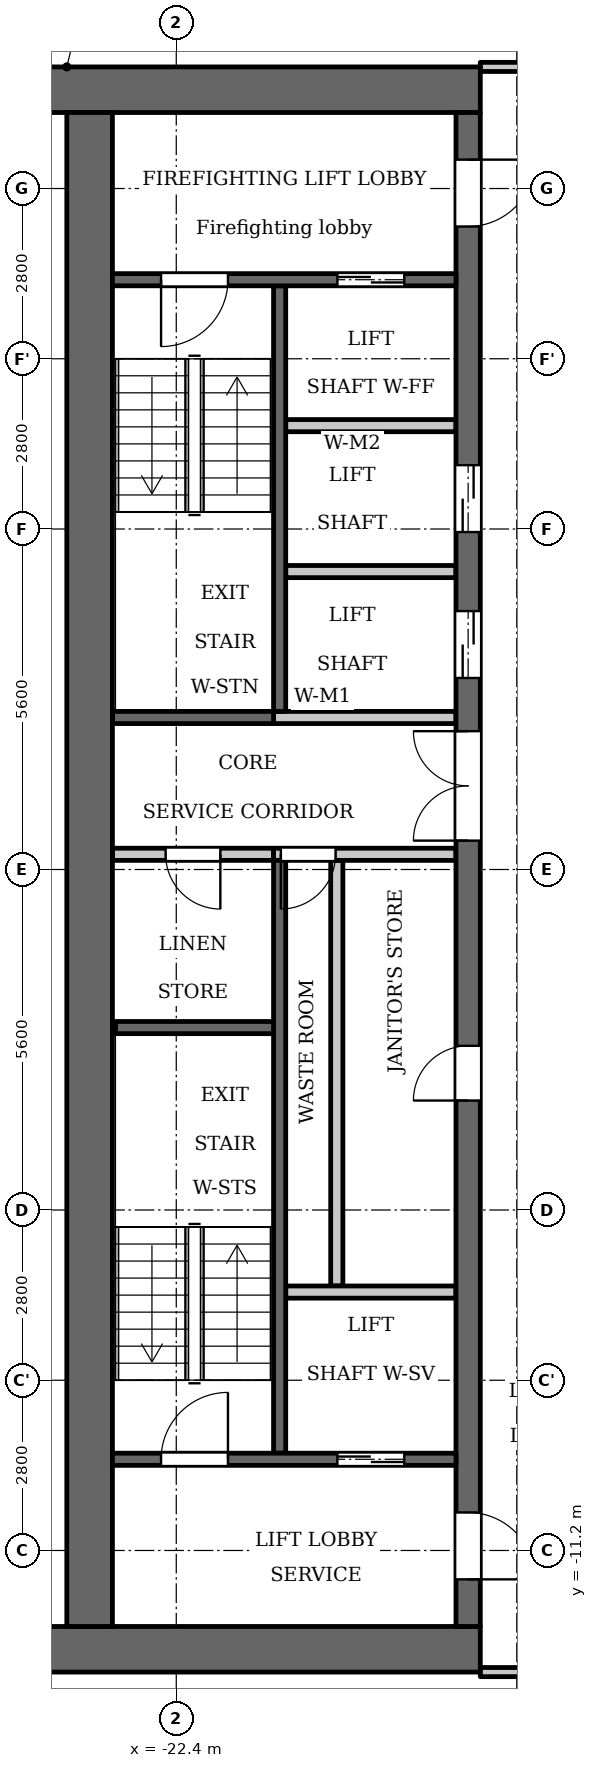
"""IFC4 building model, lengths in metres.
Left out: names, types, materials, properties, quantities, classifications, styles, units other than length and angle.
Written with IfcOpenShell. Run it as: python <this file> out.ifc"""

import sys

from ifc_helpers import new_model, si_unit, direction, frame, frame_2d, origin, place, context, subcontext, project, spatial, rectangle, extrude, element, fill, save


model = new_model("IFC4")
c1 = context("Model", 3, precision=1e-05, world=origin(), true_north=direction((0.0, 1.0)))
c2 = subcontext(c1, "Body", "Model", "MODEL_VIEW")
j1 = project(units=[si_unit("LENGTHUNIT", "METRE"), si_unit("PLANEANGLEUNIT", "RADIAN")], contexts=[c1])
p1 = place(None, origin())
s1 = spatial("IfcSite", under=j1, at=p1, CompositionType="ELEMENT")
p2 = place(p1, origin())
s2 = spatial("IfcBuilding", under=s1, at=p2, CompositionType="ELEMENT")
p3 = place(p2, frame((0.0, 0.0, 213.4)))
s3 = spatial("IfcBuildingStorey", under=s2, at=p3, CompositionType="ELEMENT", Elevation=213.4)
p4 = place(p3, frame((-20.7, 2.6, 0.0), z_axis=(0.0, 0.0, 1.0), x_axis=(0.0, 1.0, 0.0)))
e1 = element("IfcWall", 1, at=p4, inside=s3, PredefinedType="SHEAR", context=c2, shape_type="SweptSolid", body=[
    extrude(rectangle(XDim=7.0, YDim=0.2, at=frame_2d((3.5, 0.0))), origin(), (0.0, 0.0, 1.0), 3.2),
])
p5 = place(p3, frame((-20.7, -9.6, 0.0), z_axis=(0.0, 0.0, 1.0), x_axis=(0.0, 1.0, 0.0)))
e2 = element("IfcWall", 2, at=p5, inside=s3, PredefinedType="SHEAR", context=c2, shape_type="SweptSolid", body=[
    extrude(rectangle(XDim=9.75, YDim=0.2, at=frame_2d((4.875, 0.0))), origin(), (0.0, 0.0, 1.0), 3.2),
])
p6 = place(p3, frame((-20.8, 2.5, 0.0), z_axis=(0.0, 0.0, 1.0), x_axis=(-1.0, 0.0, 0.0)))
e3 = element("IfcWall", 3, at=p6, inside=s3, PredefinedType="SHEAR", context=c2, shape_type="SweptSolid", body=[
    extrude(rectangle(XDim=2.65, YDim=0.2, at=frame_2d((1.325, 0.0))), origin(), (0.0, 0.0, 1.0), 3.2),
])
p7 = place(p3, frame((-20.8, 0.25, 0.0), z_axis=(0.0, 0.0, 1.0), x_axis=(-1.0, 0.0, 0.0)))
e4 = element("IfcWall", 4, at=p7, inside=s3, PredefinedType="PARTITIONING", context=c2, shape_type="SweptSolid", body=[
    extrude(rectangle(XDim=2.65, YDim=0.2, at=frame_2d((1.325, 0.0))), origin(), (0.0, 0.0, 1.0), 3.2),
])
p8 = place(p7, frame((0.875, 0.0, 0.0)))
e5 = element("IfcOpeningElement", 5, at=p8, cuts=e4, PredefinedType="OPENING", context=c2, shape_type="SweptSolid", body=[
    extrude(rectangle(XDim=0.9, YDim=2.1, at=frame_2d((0.45, 1.05))), frame((0.0, 0.11, 0.0), z_axis=(0.0, -1.0, 0.0), x_axis=(1.0, 0.0, 0.0)), (0.0, 0.0, 1.0), 0.22),
])
for number, where, z_axis, x_axis in (
    (6, (-17.4, 12.825, 0.0), (0.0, 0.0, 1.0), (-1.0, 0.0, 0.0)),
    (7, (-17.4, -12.825, 0.0), (0.0, 0.0, 1.0), (-1.0, 0.0, 0.0)),
):
    element("IfcWall", number, at=place(p3, frame(where, z_axis=z_axis, x_axis=x_axis)), inside=s3, PredefinedType="SHEAR", context=c2, shape_type="SweptSolid", body=[
        extrude(rectangle(XDim=7.6, YDim=0.75, at=frame_2d((3.8, 0.0))), origin(), (0.0, 0.0, 1.0), 3.2),
    ])
p9 = place(p3, frame((-19.76, -6.85, 0.0), z_axis=(0.0, 0.0, 1.0), x_axis=(0.0, 1.0, 0.0)))
e8 = element("IfcWall", 8, at=p9, inside=s3, PredefinedType="PARTITIONING", context=c2, shape_type="SweptSolid", body=[
    extrude(rectangle(XDim=7.0, YDim=0.2, at=frame_2d((3.5, 0.0))), origin(), (0.0, 0.0, 1.0), 3.2),
])
p10 = place(p3, frame((-17.6, -12.45, 0.0), z_axis=(0.0, 0.0, 1.0), x_axis=(0.0, 1.0, 0.0)))
e9 = element("IfcWall", 9, at=p10, inside=s3, PredefinedType="SHEAR", context=c2, shape_type="SweptSolid", body=[
    extrude(rectangle(XDim=24.9, YDim=0.4, at=frame_2d((12.45, 0.0))), origin(), (0.0, 0.0, 1.0), 3.2),
])
p11 = place(p10, frame((8.65, 0.0, 0.0)))
e10 = element("IfcOpeningElement", 10, at=p11, cuts=e9, PredefinedType="OPENING", context=c2, shape_type="SweptSolid", body=[
    extrude(rectangle(XDim=0.9, YDim=2.1, at=frame_2d((0.45, 1.05))), frame((0.0, 0.21, 0.0), z_axis=(0.0, -1.0, 0.0), x_axis=(1.0, 0.0, 0.0)), (0.0, 0.0, 1.0), 0.42),
])
p12 = place(p10, frame((15.6, 0.0, 0.0)))
e11 = element("IfcOpeningElement", 11, at=p12, cuts=e9, PredefinedType="OPENING", context=c2, shape_type="SweptSolid", body=[
    extrude(rectangle(XDim=1.1, YDim=2.1, at=frame_2d((0.55, 1.05))), frame((0.0, 0.21, 0.0), z_axis=(0.0, -1.0, 0.0), x_axis=(1.0, 0.0, 0.0)), (0.0, 0.0, 1.0), 0.42),
])
p13 = place(p10, frame((18.0, 0.0, 0.0)))
e12 = element("IfcOpeningElement", 12, at=p13, cuts=e9, PredefinedType="OPENING", context=c2, shape_type="SweptSolid", body=[
    extrude(rectangle(XDim=1.1, YDim=2.1, at=frame_2d((0.55, 1.05))), frame((0.0, 0.21, 0.0), z_axis=(0.0, -1.0, 0.0), x_axis=(1.0, 0.0, 0.0)), (0.0, 0.0, 1.0), 0.42),
])
p14 = place(p10, frame((23.025, 0.0, 0.0)))
e13 = element("IfcOpeningElement", 13, at=p14, cuts=e9, PredefinedType="OPENING", context=c2, shape_type="SweptSolid", body=[
    extrude(rectangle(XDim=1.1, YDim=2.1, at=frame_2d((0.55, 1.05))), frame((0.0, 0.21, 0.0), z_axis=(0.0, -1.0, 0.0), x_axis=(1.0, 0.0, 0.0)), (0.0, 0.0, 1.0), 0.42),
])
p15 = place(p10, frame((0.775, 0.0, 0.0)))
e14 = element("IfcOpeningElement", 14, at=p15, cuts=e9, PredefinedType="OPENING", context=c2, shape_type="SweptSolid", body=[
    extrude(rectangle(XDim=1.1, YDim=2.1, at=frame_2d((0.55, 1.05))), frame((0.0, 0.21, 0.0), z_axis=(0.0, -1.0, 0.0), x_axis=(1.0, 0.0, 0.0)), (0.0, 0.0, 1.0), 0.42),
])
p16 = place(p10, frame((12.925, 0.0, 0.0)))
e15 = element("IfcOpeningElement", 15, at=p16, cuts=e9, PredefinedType="OPENING", context=c2, shape_type="SweptSolid", body=[
    extrude(rectangle(XDim=1.8, YDim=2.1, at=frame_2d((0.9, 1.05))), frame((0.0, 0.21, 0.0), z_axis=(0.0, -1.0, 0.0), x_axis=(1.0, 0.0, 0.0)), (0.0, 0.0, 1.0), 0.42),
])
p17 = place(p3, frame((-23.825, -12.45, 0.0), z_axis=(0.0, 0.0, 1.0), x_axis=(0.0, 1.0, 0.0)))
e16 = element("IfcWall", 16, at=p17, inside=s3, PredefinedType="SHEAR", context=c2, shape_type="SweptSolid", body=[
    extrude(rectangle(XDim=24.9, YDim=0.75, at=frame_2d((12.45, 0.0))), origin(), (0.0, 0.0, 1.0), 3.2),
])
p18 = place(p3, frame((-17.8, -9.7, 0.0), z_axis=(0.0, 0.0, 1.0), x_axis=(-1.0, 0.0, 0.0)))
e17 = element("IfcWall", 17, at=p18, inside=s3, PredefinedType="SHEAR", context=c2, shape_type="SweptSolid", body=[
    extrude(rectangle(XDim=5.65, YDim=0.2, at=frame_2d((2.825, 0.0))), origin(), (0.0, 0.0, 1.0), 3.2),
])
p19 = place(p18, frame((0.85, 0.0, 0.0)))
e18 = element("IfcOpeningElement", 18, at=p19, cuts=e17, PredefinedType="OPENING", context=c2, shape_type="SweptSolid", body=[
    extrude(rectangle(XDim=1.1, YDim=2.1, at=frame_2d((0.55, 1.05))), frame((0.0, 0.11, 0.0), z_axis=(0.0, -1.0, 0.0), x_axis=(1.0, 0.0, 0.0)), (0.0, 0.0, 1.0), 0.22),
])
p20 = place(p18, frame((3.75, 0.0, 0.0)))
e19 = element("IfcOpeningElement", 19, at=p20, cuts=e17, PredefinedType="OPENING", context=c2, shape_type="SweptSolid", body=[
    extrude(rectangle(XDim=1.1, YDim=2.1, at=frame_2d((0.55, 1.05))), frame((0.0, 0.11, 0.0), z_axis=(0.0, -1.0, 0.0), x_axis=(1.0, 0.0, 0.0)), (0.0, 0.0, 1.0), 0.22),
])
p21 = place(p3, frame((-17.8, -6.95, 0.0), z_axis=(0.0, 0.0, 1.0), x_axis=(-1.0, 0.0, 0.0)))
e20 = element("IfcWall", 20, at=p21, inside=s3, PredefinedType="PARTITIONING", context=c2, shape_type="SweptSolid", body=[
    extrude(rectangle(XDim=2.8, YDim=0.2, at=frame_2d((1.4, 0.0))), origin(), (0.0, 0.0, 1.0), 3.2),
])
p22 = place(p3, frame((-17.8, 0.25, 0.0), z_axis=(0.0, 0.0, 1.0), x_axis=(-1.0, 0.0, 0.0)))
e21 = element("IfcWall", 21, at=p22, inside=s3, PredefinedType="PARTITIONING", context=c2, shape_type="SweptSolid", body=[
    extrude(rectangle(XDim=3.0, YDim=0.2, at=frame_2d((1.5, 0.0))), origin(), (0.0, 0.0, 1.0), 3.2),
])
p23 = place(p22, frame((1.98, 0.0, 0.0)))
e22 = element("IfcOpeningElement", 22, at=p23, cuts=e21, PredefinedType="OPENING", context=c2, shape_type="SweptSolid", body=[
    extrude(rectangle(XDim=0.9, YDim=2.1, at=frame_2d((0.45, 1.05))), frame((0.0, 0.11, 0.0), z_axis=(0.0, -1.0, 0.0), x_axis=(1.0, 0.0, 0.0)), (0.0, 0.0, 1.0), 0.22),
])
p24 = place(p3, frame((-17.8, 2.5, 0.0), z_axis=(0.0, 0.0, 1.0), x_axis=(-1.0, 0.0, 0.0)))
e23 = element("IfcWall", 23, at=p24, inside=s3, PredefinedType="PARTITIONING", context=c2, shape_type="SweptSolid", body=[
    extrude(rectangle(XDim=3.0, YDim=0.2, at=frame_2d((1.5, 0.0))), origin(), (0.0, 0.0, 1.0), 3.2),
])
for number, where, z_axis, x_axis in (
    (24, (-17.8, 4.9, 0.0), (0.0, 0.0, 1.0), (-1.0, 0.0, 0.0)),
    (25, (-17.8, 7.3, 0.0), (0.0, 0.0, 1.0), (-1.0, 0.0, 0.0)),
):
    element("IfcWall", number, at=place(p3, frame(where, z_axis=z_axis, x_axis=x_axis)), inside=s3, PredefinedType="PARTITIONING", context=c2, shape_type="SweptSolid", body=[
        extrude(rectangle(XDim=2.8, YDim=0.2, at=frame_2d((1.4, 0.0))), origin(), (0.0, 0.0, 1.0), 3.2),
    ])
p25 = place(p3, frame((-17.8, 9.7, 0.0), z_axis=(0.0, 0.0, 1.0), x_axis=(-1.0, 0.0, 0.0)))
e26 = element("IfcWall", 26, at=p25, inside=s3, PredefinedType="SHEAR", context=c2, shape_type="SweptSolid", body=[
    extrude(rectangle(XDim=5.65, YDim=0.2, at=frame_2d((2.825, 0.0))), origin(), (0.0, 0.0, 1.0), 3.2),
])
p26 = place(p25, frame((0.85, 0.0, 0.0)))
e27 = element("IfcOpeningElement", 27, at=p26, cuts=e26, PredefinedType="OPENING", context=c2, shape_type="SweptSolid", body=[
    extrude(rectangle(XDim=1.1, YDim=2.1, at=frame_2d((0.55, 1.05))), frame((0.0, 0.11, 0.0), z_axis=(0.0, -1.0, 0.0), x_axis=(1.0, 0.0, 0.0)), (0.0, 0.0, 1.0), 0.22),
])
p27 = place(p25, frame((3.75, 0.0, 0.0)))
e28 = element("IfcOpeningElement", 28, at=p27, cuts=e26, PredefinedType="OPENING", context=c2, shape_type="SweptSolid", body=[
    extrude(rectangle(XDim=1.1, YDim=2.1, at=frame_2d((0.55, 1.05))), frame((0.0, 0.11, 0.0), z_axis=(0.0, -1.0, 0.0), x_axis=(1.0, 0.0, 0.0)), (0.0, 0.0, 1.0), 0.22),
])
p28 = place(p3, frame((-20.8, -2.6, 0.0), z_axis=(0.0, 0.0, 1.0), x_axis=(-1.0, 0.0, 0.0)))
e29 = element("IfcWall", 29, at=p28, inside=s3, PredefinedType="SHEAR", context=c2, shape_type="SweptSolid", body=[
    extrude(rectangle(XDim=2.6, YDim=0.2, at=frame_2d((1.3, 0.0))), origin(), (0.0, 0.0, 1.0), 3.2),
])
p29 = place(p3, frame((-17.4, -13.2, 0.0), z_axis=(0.0, 0.0, 1.0), x_axis=(1.0, 0.0, 0.0)))
e30 = element("IfcWall", 30, at=p29, inside=s3, PredefinedType="PARTITIONING", context=c2, shape_type="SweptSolid", body=[
    extrude(rectangle(XDim=34.8, YDim=0.15, at=frame_2d((17.4, 0.0))), origin(), (0.0, 0.0, 1.0), 3.2),
])
p30 = place(p29, frame((0.65, 0.0, 0.0)))
e31 = element("IfcOpeningElement", 31, at=p30, cuts=e30, PredefinedType="OPENING", context=c2, shape_type="SweptSolid", body=[
    extrude(rectangle(XDim=1.0, YDim=2.1, at=frame_2d((0.5, 1.05))), frame((0.0, 0.085, 0.0), z_axis=(0.0, -1.0, 0.0), x_axis=(1.0, 0.0, 0.0)), (0.0, 0.0, 1.0), 0.17),
])
p31 = place(p29, frame((33.05, 0.0, 0.0)))
e32 = element("IfcOpeningElement", 32, at=p31, cuts=e30, PredefinedType="OPENING", context=c2, shape_type="SweptSolid", body=[
    extrude(rectangle(XDim=1.0, YDim=2.1, at=frame_2d((0.5, 1.05))), frame((0.0, 0.085, 0.0), z_axis=(0.0, -1.0, 0.0), x_axis=(1.0, 0.0, 0.0)), (0.0, 0.0, 1.0), 0.17),
])
p32 = place(p29, frame((4.55, 0.0, 0.0)))
e33 = element("IfcOpeningElement", 33, at=p32, cuts=e30, PredefinedType="OPENING", context=c2, shape_type="SweptSolid", body=[
    extrude(rectangle(XDim=1.0, YDim=2.1, at=frame_2d((0.5, 1.05))), frame((0.0, 0.085, 0.0), z_axis=(0.0, -1.0, 0.0), x_axis=(1.0, 0.0, 0.0)), (0.0, 0.0, 1.0), 0.17),
])
p33 = place(p29, frame((6.9, 0.0, 0.0)))
e34 = element("IfcOpeningElement", 34, at=p33, cuts=e30, PredefinedType="OPENING", context=c2, shape_type="SweptSolid", body=[
    extrude(rectangle(XDim=1.0, YDim=2.1, at=frame_2d((0.5, 1.05))), frame((0.0, 0.085, 0.0), z_axis=(0.0, -1.0, 0.0), x_axis=(1.0, 0.0, 0.0)), (0.0, 0.0, 1.0), 0.17),
])
p34 = place(p29, frame((15.75, 0.0, 0.0)))
e35 = element("IfcOpeningElement", 35, at=p34, cuts=e30, PredefinedType="OPENING", context=c2, shape_type="SweptSolid", body=[
    extrude(rectangle(XDim=1.0, YDim=2.1, at=frame_2d((0.5, 1.05))), frame((0.0, 0.085, 0.0), z_axis=(0.0, -1.0, 0.0), x_axis=(1.0, 0.0, 0.0)), (0.0, 0.0, 1.0), 0.17),
])
p35 = place(p29, frame((18.1, 0.0, 0.0)))
e36 = element("IfcOpeningElement", 36, at=p35, cuts=e30, PredefinedType="OPENING", context=c2, shape_type="SweptSolid", body=[
    extrude(rectangle(XDim=1.0, YDim=2.1, at=frame_2d((0.5, 1.05))), frame((0.0, 0.085, 0.0), z_axis=(0.0, -1.0, 0.0), x_axis=(1.0, 0.0, 0.0)), (0.0, 0.0, 1.0), 0.17),
])
p36 = place(p29, frame((26.95, 0.0, 0.0)))
e37 = element("IfcOpeningElement", 37, at=p36, cuts=e30, PredefinedType="OPENING", context=c2, shape_type="SweptSolid", body=[
    extrude(rectangle(XDim=1.0, YDim=2.1, at=frame_2d((0.5, 1.05))), frame((0.0, 0.085, 0.0), z_axis=(0.0, -1.0, 0.0), x_axis=(1.0, 0.0, 0.0)), (0.0, 0.0, 1.0), 0.17),
])
p37 = place(p29, frame((29.25, 0.0, 0.0)))
e38 = element("IfcOpeningElement", 38, at=p37, cuts=e30, PredefinedType="OPENING", context=c2, shape_type="SweptSolid", body=[
    extrude(rectangle(XDim=1.0, YDim=2.1, at=frame_2d((0.5, 1.05))), frame((0.0, 0.085, 0.0), z_axis=(0.0, -1.0, 0.0), x_axis=(1.0, 0.0, 0.0)), (0.0, 0.0, 1.0), 0.17),
])
p38 = place(p3, frame((-17.4, 13.2, 0.0), z_axis=(0.0, 0.0, 1.0), x_axis=(1.0, 0.0, 0.0)))
e39 = element("IfcWall", 39, at=p38, inside=s3, PredefinedType="PARTITIONING", context=c2, shape_type="SweptSolid", body=[
    extrude(rectangle(XDim=34.8, YDim=0.15, at=frame_2d((17.4, 0.0))), origin(), (0.0, 0.0, 1.0), 3.2),
])
p39 = place(p38, frame((0.75, 0.0, 0.0)))
e40 = element("IfcOpeningElement", 40, at=p39, cuts=e39, PredefinedType="OPENING", context=c2, shape_type="SweptSolid", body=[
    extrude(rectangle(XDim=1.0, YDim=2.1, at=frame_2d((0.5, 1.05))), frame((0.0, 0.085, 0.0), z_axis=(0.0, -1.0, 0.0), x_axis=(1.0, 0.0, 0.0)), (0.0, 0.0, 1.0), 0.17),
])
p40 = place(p38, frame((33.15, 0.0, 0.0)))
e41 = element("IfcOpeningElement", 41, at=p40, cuts=e39, PredefinedType="OPENING", context=c2, shape_type="SweptSolid", body=[
    extrude(rectangle(XDim=1.0, YDim=2.1, at=frame_2d((0.5, 1.05))), frame((0.0, 0.085, 0.0), z_axis=(0.0, -1.0, 0.0), x_axis=(1.0, 0.0, 0.0)), (0.0, 0.0, 1.0), 0.17),
])
p41 = place(p38, frame((12.45, 0.0, 0.0)))
e42 = element("IfcOpeningElement", 42, at=p41, cuts=e39, PredefinedType="OPENING", context=c2, shape_type="SweptSolid", body=[
    extrude(rectangle(XDim=1.0, YDim=2.1, at=frame_2d((0.5, 1.05))), frame((0.0, 0.085, 0.0), z_axis=(0.0, -1.0, 0.0), x_axis=(1.0, 0.0, 0.0)), (0.0, 0.0, 1.0), 0.17),
])
p42 = place(p38, frame((18.05, 0.0, 0.0)))
e43 = element("IfcOpeningElement", 43, at=p42, cuts=e39, PredefinedType="OPENING", context=c2, shape_type="SweptSolid", body=[
    extrude(rectangle(XDim=1.0, YDim=2.1, at=frame_2d((0.5, 1.05))), frame((0.0, 0.085, 0.0), z_axis=(0.0, -1.0, 0.0), x_axis=(1.0, 0.0, 0.0)), (0.0, 0.0, 1.0), 0.17),
])
p43 = place(p19, origin())
e44 = element("IfcDoor", 44, at=p43, inside=s3, OperationType="DOUBLE_DOOR_SLIDING", PredefinedType="DOOR", context=c2, shape_type="SweptSolid", body=[
    extrude(rectangle(XDim=1.1, YDim=2.1, at=frame_2d((0.55, 1.05))), frame((0.0, 0.025, 0.0), z_axis=(0.0, -1.0, 0.0), x_axis=(1.0, 0.0, 0.0)), (0.0, 0.0, 1.0), 0.05),
])
fill(e18, e44)
p44 = place(p11, origin())
e45 = element("IfcDoor", 45, at=p44, inside=s3, OperationType="SINGLE_SWING_RIGHT", PredefinedType="DOOR", context=c2, shape_type="SweptSolid", body=[
    extrude(rectangle(XDim=0.9, YDim=2.1, at=frame_2d((0.45, 1.05))), frame((0.0, 0.025, 0.0), z_axis=(0.0, -1.0, 0.0), x_axis=(1.0, 0.0, 0.0)), (0.0, 0.0, 1.0), 0.05),
])
fill(e10, e45)
p45 = place(p23, origin())
e46 = element("IfcDoor", 46, at=p45, inside=s3, OperationType="SINGLE_SWING_LEFT", PredefinedType="DOOR", context=c2, shape_type="SweptSolid", body=[
    extrude(rectangle(XDim=0.9, YDim=2.1, at=frame_2d((0.45, 1.05))), frame((0.0, 0.025, 0.0), z_axis=(0.0, -1.0, 0.0), x_axis=(1.0, 0.0, 0.0)), (0.0, 0.0, 1.0), 0.05),
])
fill(e22, e46)
p46 = place(p12, origin())
e47 = element("IfcDoor", 47, at=p46, inside=s3, OperationType="DOUBLE_DOOR_SLIDING", PredefinedType="DOOR", context=c2, shape_type="SweptSolid", body=[
    extrude(rectangle(XDim=1.1, YDim=2.1, at=frame_2d((0.55, 1.05))), frame((0.0, 0.025, 0.0), z_axis=(0.0, -1.0, 0.0), x_axis=(1.0, 0.0, 0.0)), (0.0, 0.0, 1.0), 0.05),
])
fill(e11, e47)
p47 = place(p13, origin())
e48 = element("IfcDoor", 48, at=p47, inside=s3, OperationType="DOUBLE_DOOR_SLIDING", PredefinedType="DOOR", context=c2, shape_type="SweptSolid", body=[
    extrude(rectangle(XDim=1.1, YDim=2.1, at=frame_2d((0.55, 1.05))), frame((0.0, 0.025, 0.0), z_axis=(0.0, -1.0, 0.0), x_axis=(1.0, 0.0, 0.0)), (0.0, 0.0, 1.0), 0.05),
])
fill(e12, e48)
p48 = place(p26, origin())
e49 = element("IfcDoor", 49, at=p48, inside=s3, OperationType="DOUBLE_DOOR_SLIDING", PredefinedType="DOOR", context=c2, shape_type="SweptSolid", body=[
    extrude(rectangle(XDim=1.1, YDim=2.1, at=frame_2d((0.55, 1.05))), frame((0.0, 0.025, 0.0), z_axis=(0.0, -1.0, 0.0), x_axis=(1.0, 0.0, 0.0)), (0.0, 0.0, 1.0), 0.05),
])
fill(e27, e49)
p49 = place(p14, origin())
e50 = element("IfcDoor", 50, at=p49, inside=s3, OperationType="SINGLE_SWING_RIGHT", PredefinedType="DOOR", context=c2, shape_type="SweptSolid", body=[
    extrude(rectangle(XDim=1.1, YDim=2.1, at=frame_2d((0.55, 1.05))), frame((0.0, 0.025, 0.0), z_axis=(0.0, -1.0, 0.0), x_axis=(1.0, 0.0, 0.0)), (0.0, 0.0, 1.0), 0.05),
])
fill(e13, e50)
p50 = place(p15, origin())
e51 = element("IfcDoor", 51, at=p50, inside=s3, OperationType="SINGLE_SWING_LEFT", PredefinedType="DOOR", context=c2, shape_type="SweptSolid", body=[
    extrude(rectangle(XDim=1.1, YDim=2.1, at=frame_2d((0.55, 1.05))), frame((0.0, 0.025, 0.0), z_axis=(0.0, -1.0, 0.0), x_axis=(1.0, 0.0, 0.0)), (0.0, 0.0, 1.0), 0.05),
])
fill(e14, e51)
p51 = place(p27, origin())
e52 = element("IfcDoor", 52, at=p51, inside=s3, OperationType="SINGLE_SWING_LEFT", PredefinedType="DOOR", context=c2, shape_type="SweptSolid", body=[
    extrude(rectangle(XDim=1.1, YDim=2.1, at=frame_2d((0.55, 1.05))), frame((0.0, 0.025, 0.0), z_axis=(0.0, -1.0, 0.0), x_axis=(1.0, 0.0, 0.0)), (0.0, 0.0, 1.0), 0.05),
])
fill(e28, e52)
p52 = place(p20, origin())
e53 = element("IfcDoor", 53, at=p52, inside=s3, OperationType="SINGLE_SWING_LEFT", PredefinedType="DOOR", context=c2, shape_type="SweptSolid", body=[
    extrude(rectangle(XDim=1.1, YDim=2.1, at=frame_2d((0.55, 1.05))), frame((0.0, 0.025, 0.0), z_axis=(0.0, -1.0, 0.0), x_axis=(1.0, 0.0, 0.0)), (0.0, 0.0, 1.0), 0.05),
])
fill(e19, e53)
p53 = place(p16, origin())
e54 = element("IfcDoor", 54, at=p53, inside=s3, OperationType="DOUBLE_DOOR_SINGLE_SWING", PredefinedType="DOOR", context=c2, shape_type="SweptSolid", body=[
    extrude(rectangle(XDim=1.8, YDim=2.1, at=frame_2d((0.9, 1.05))), frame((0.0, 0.025, 0.0), z_axis=(0.0, -1.0, 0.0), x_axis=(1.0, 0.0, 0.0)), (0.0, 0.0, 1.0), 0.05),
])
fill(e15, e54)
p54 = place(p8, origin())
e55 = element("IfcDoor", 55, at=p54, inside=s3, OperationType="SINGLE_SWING_RIGHT", PredefinedType="DOOR", context=c2, shape_type="SweptSolid", body=[
    extrude(rectangle(XDim=0.9, YDim=2.1, at=frame_2d((0.45, 1.05))), frame((0.0, 0.025, 0.0), z_axis=(0.0, -1.0, 0.0), x_axis=(1.0, 0.0, 0.0)), (0.0, 0.0, 1.0), 0.05),
])
fill(e5, e55)
save(model, sys.argv[1])
